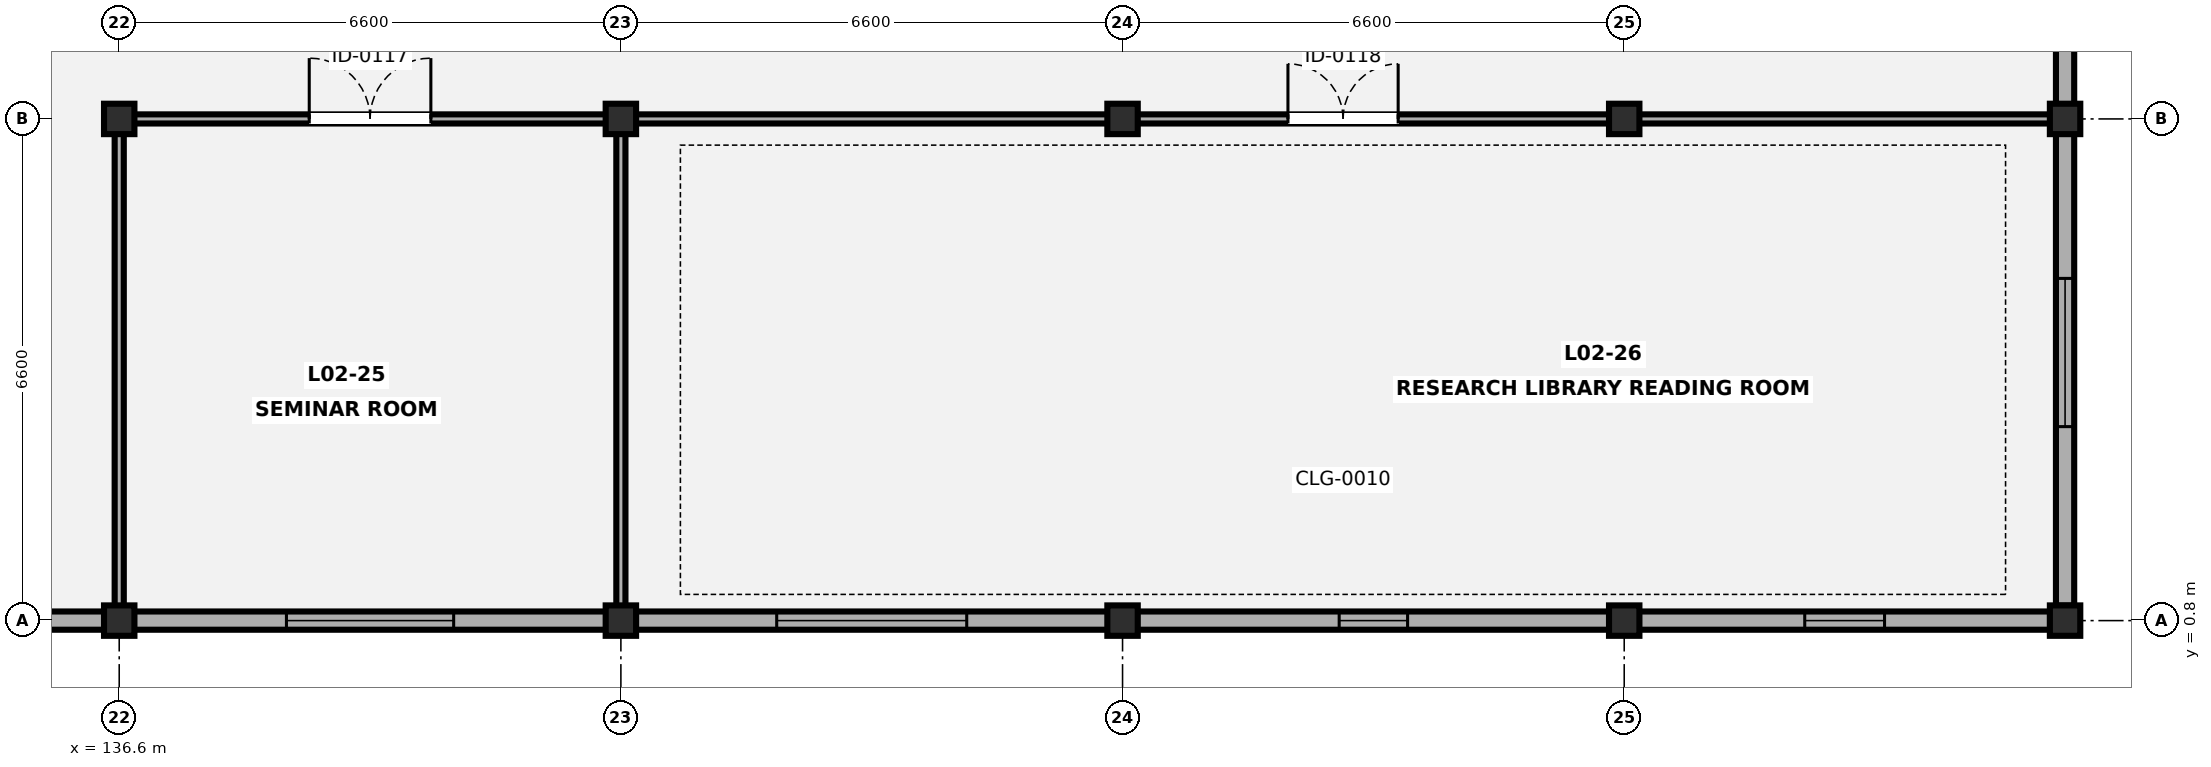
"""IFC4 building model, lengths in metres.
Left out: names, types, materials, properties, quantities, classifications, styles, units other than length and angle.
Written with IfcOpenShell. Run it as: python <this file> out.ifc"""

import sys

from ifc_helpers import new_model, si_unit, direction, frame, frame_2d, origin, origin_2d, place, context, subcontext, project, spatial, rectangle, i_section, extrude, element, fill, save


model = new_model("IFC4")
c1 = context("Model", 3, precision=1e-05, world=origin(), true_north=direction((0.0, 1.0)))
c2 = subcontext(c1, "Body", "Model", "MODEL_VIEW")
j1 = project(units=[si_unit("LENGTHUNIT", "METRE"), si_unit("PLANEANGLEUNIT", "RADIAN")], contexts=[c1])
p1 = place(None, origin())
s1 = spatial("IfcSite", under=j1, at=p1, CompositionType="ELEMENT")
p2 = place(p1, origin())
s2 = spatial("IfcBuilding", under=s1, at=p2, CompositionType="ELEMENT")
p3 = place(p2, frame((0.0, 0.0, 9.1)))
s3 = spatial("IfcBuildingStorey", under=s2, at=p3, CompositionType="ELEMENT", Elevation=9.1)
for number, where, z_axis, x_axis in (
    (1, (136.6, 0.8, 0.0), (0.0, 0.0, 1.0), (1.0, 0.0, 0.0)),
    (2, (136.6, 7.4, 0.0), (0.0, 0.0, 1.0), (1.0, 0.0, 0.0)),
    (3, (143.2, 0.8, 0.0), (0.0, 0.0, 1.0), (1.0, 0.0, 0.0)),
    (4, (143.2, 7.4, 0.0), (0.0, 0.0, 1.0), (1.0, 0.0, 0.0)),
    (5, (149.8, 0.8, 0.0), (0.0, 0.0, 1.0), (1.0, 0.0, 0.0)),
    (6, (149.8, 7.4, 0.0), (0.0, 0.0, 1.0), (1.0, 0.0, 0.0)),
    (7, (156.4, 0.8, 0.0), (0.0, 0.0, 1.0), (1.0, 0.0, 0.0)),
    (8, (156.4, 7.4, 0.0), (0.0, 0.0, 1.0), (1.0, 0.0, 0.0)),
    (9, (162.2, 0.8, 0.0), (0.0, 0.0, 1.0), (1.0, 0.0, 0.0)),
    (10, (162.2, 7.4, 0.0), (0.0, 0.0, 1.0), (1.0, 0.0, 0.0)),
):
    element("IfcColumn", number, at=place(p3, frame(where, z_axis=z_axis, x_axis=x_axis)), inside=s3, PredefinedType="COLUMN", context=c2, shape_type="SweptSolid", body=[
        extrude(i_section(OverallWidth=0.4, OverallDepth=0.4, WebThickness=0.02, FlangeThickness=0.035, FilletRadius=0.016, at=origin_2d()), origin(), (0.0, 0.0, 1.0), 4.2),
    ])
p4 = place(p3, frame((162.2, 20.402, 0.0), z_axis=(0.0, 0.0, 1.0), x_axis=(0.0, -1.0, 0.0)))
e11 = element("IfcWall", 11, at=p4, inside=s3, PredefinedType="SOLIDWALL", context=c2, shape_type="SweptSolid", body=[
    extrude(rectangle(XDim=19.404, YDim=0.24, at=frame_2d((9.702, 0.0))), origin(), (0.0, 0.0, 1.0), 3.372),
])
p5 = place(p4, frame((2.4, 0.0, 0.85)))
e12 = element("IfcOpeningElement", 12, at=p5, cuts=e11, PredefinedType="OPENING", context=c2, shape_type="SweptSolid", body=[
    extrude(rectangle(XDim=1.55, YDim=1.4, at=frame_2d((0.775, 0.7))), frame((0.0, 0.13, 0.0), z_axis=(0.0, -1.0, 0.0), x_axis=(1.0, 0.0, 0.0)), (0.0, 0.0, 1.0), 0.26),
])
p6 = place(p4, frame((15.1, 0.0, 0.85)))
e13 = element("IfcOpeningElement", 13, at=p6, cuts=e11, PredefinedType="OPENING", context=c2, shape_type="SweptSolid", body=[
    extrude(rectangle(XDim=1.95, YDim=1.5, at=frame_2d((0.975, 0.75))), frame((0.0, 0.13, 0.0), z_axis=(0.0, -1.0, 0.0), x_axis=(1.0, 0.0, 0.0)), (0.0, 0.0, 1.0), 0.26),
])
p7 = place(p3, frame((162.002, 0.8, 0.0), z_axis=(0.0, 0.0, 1.0), x_axis=(-1.0, 0.0, 0.0)))
e14 = element("IfcWall", 14, at=p7, inside=s3, PredefinedType="SOLIDWALL", context=c2, shape_type="SweptSolid", body=[
    extrude(rectangle(XDim=58.204, YDim=0.24, at=frame_2d((29.102, 0.0))), origin(), (0.0, 0.0, 1.0), 3.505),
])
p8 = place(p7, frame((53.877, 0.0, 0.85)))
e15 = element("IfcOpeningElement", 15, at=p8, cuts=e14, PredefinedType="OPENING", context=c2, shape_type="SweptSolid", body=[
    extrude(rectangle(XDim=2.45, YDim=1.4, at=frame_2d((1.225, 0.7))), frame((0.0, 0.13, 0.0), z_axis=(0.0, -1.0, 0.0), x_axis=(1.0, 0.0, 0.0)), (0.0, 0.0, 1.0), 0.26),
])
p9 = place(p7, frame((47.902, 0.0, 0.85)))
e16 = element("IfcOpeningElement", 16, at=p9, cuts=e14, PredefinedType="OPENING", context=c2, shape_type="SweptSolid", body=[
    extrude(rectangle(XDim=1.2, YDim=1.25, at=frame_2d((0.6, 0.625))), frame((0.0, 0.13, 0.0), z_axis=(0.0, -1.0, 0.0), x_axis=(1.0, 0.0, 0.0)), (0.0, 0.0, 1.0), 0.26),
])
p10 = place(p7, frame((41.177, 0.0, 0.85)))
e17 = element("IfcOpeningElement", 17, at=p10, cuts=e14, PredefinedType="OPENING", context=c2, shape_type="SweptSolid", body=[
    extrude(rectangle(XDim=1.45, YDim=1.25, at=frame_2d((0.725, 0.625))), frame((0.0, 0.13, 0.0), z_axis=(0.0, -1.0, 0.0), x_axis=(1.0, 0.0, 0.0)), (0.0, 0.0, 1.0), 0.26),
])
p11 = place(p7, frame((34.477, 0.0, 0.85)))
e18 = element("IfcOpeningElement", 18, at=p11, cuts=e14, PredefinedType="OPENING", context=c2, shape_type="SweptSolid", body=[
    extrude(rectangle(XDim=1.65, YDim=1.25, at=frame_2d((0.825, 0.625))), frame((0.0, 0.13, 0.0), z_axis=(0.0, -1.0, 0.0), x_axis=(1.0, 0.0, 0.0)), (0.0, 0.0, 1.0), 0.26),
])
p12 = place(p7, frame((27.752, 0.0, 0.85)))
e19 = element("IfcOpeningElement", 19, at=p12, cuts=e14, PredefinedType="OPENING", context=c2, shape_type="SweptSolid", body=[
    extrude(rectangle(XDim=1.9, YDim=1.25, at=frame_2d((0.95, 0.625))), frame((0.0, 0.13, 0.0), z_axis=(0.0, -1.0, 0.0), x_axis=(1.0, 0.0, 0.0)), (0.0, 0.0, 1.0), 0.26),
])
p13 = place(p7, frame((21.002, 0.0, 0.85)))
e20 = element("IfcOpeningElement", 20, at=p13, cuts=e14, PredefinedType="OPENING", context=c2, shape_type="SweptSolid", body=[
    extrude(rectangle(XDim=2.2, YDim=1.25, at=frame_2d((1.1, 0.625))), frame((0.0, 0.13, 0.0), z_axis=(0.0, -1.0, 0.0), x_axis=(1.0, 0.0, 0.0)), (0.0, 0.0, 1.0), 0.26),
])
p14 = place(p7, frame((14.252, 0.0, 0.85)))
e21 = element("IfcOpeningElement", 21, at=p14, cuts=e14, PredefinedType="OPENING", context=c2, shape_type="SweptSolid", body=[
    extrude(rectangle(XDim=2.5, YDim=1.25, at=frame_2d((1.25, 0.625))), frame((0.0, 0.13, 0.0), z_axis=(0.0, -1.0, 0.0), x_axis=(1.0, 0.0, 0.0)), (0.0, 0.0, 1.0), 0.26),
])
p15 = place(p7, frame((8.452, 0.0, 0.85)))
e22 = element("IfcOpeningElement", 22, at=p15, cuts=e14, PredefinedType="OPENING", context=c2, shape_type="SweptSolid", body=[
    extrude(rectangle(XDim=0.9, YDim=1.35, at=frame_2d((0.45, 0.675))), frame((0.0, 0.13, 0.0), z_axis=(0.0, -1.0, 0.0), x_axis=(1.0, 0.0, 0.0)), (0.0, 0.0, 1.0), 0.26),
])
p16 = place(p7, frame((2.177, 0.0, 0.85)))
e23 = element("IfcOpeningElement", 23, at=p16, cuts=e14, PredefinedType="OPENING", context=c2, shape_type="SweptSolid", body=[
    extrude(rectangle(XDim=1.05, YDim=1.35, at=frame_2d((0.525, 0.675))), frame((0.0, 0.13, 0.0), z_axis=(0.0, -1.0, 0.0), x_axis=(1.0, 0.0, 0.0)), (0.0, 0.0, 1.0), 0.26),
])
p17 = place(p3, frame((136.6, 7.4, 0.0), z_axis=(0.0, 0.0, 1.0), x_axis=(1.0, 0.0, 0.0)))
e24 = element("IfcWall", 24, at=p17, inside=s3, PredefinedType="PARTITIONING", context=c2, shape_type="SweptSolid", body=[
    extrude(rectangle(XDim=6.6, YDim=0.12, at=frame_2d((3.3, 0.0))), origin(), (0.0, 0.0, 1.0), 3.293),
])
p18 = place(p17, frame((2.5, 0.0, 0.0)))
e25 = element("IfcOpeningElement", 25, at=p18, cuts=e24, PredefinedType="OPENING", context=c2, shape_type="SweptSolid", body=[
    extrude(rectangle(XDim=1.6, YDim=2.18, at=frame_2d((0.8, 1.09))), frame((0.0, 0.07, 0.0), z_axis=(0.0, -1.0, 0.0), x_axis=(1.0, 0.0, 0.0)), (0.0, 0.0, 1.0), 0.14),
])
p19 = place(p3, frame((136.6, 0.942, 0.0), z_axis=(0.0, 0.0, 1.0), x_axis=(0.0, 1.0, 0.0)))
e26 = element("IfcWall", 26, at=p19, inside=s3, PredefinedType="PARTITIONING", context=c2, shape_type="SweptSolid", body=[
    extrude(rectangle(XDim=6.396, YDim=0.12, at=frame_2d((3.198, 0.0))), origin(), (0.0, 0.0, 1.0), 3.372),
])
p20 = place(p3, frame((143.2, 0.942, 0.0), z_axis=(0.0, 0.0, 1.0), x_axis=(0.0, 1.0, 0.0)))
e27 = element("IfcWall", 27, at=p20, inside=s3, PredefinedType="PARTITIONING", context=c2, shape_type="SweptSolid", body=[
    extrude(rectangle(XDim=6.458, YDim=0.12, at=frame_2d((3.229, 0.0))), origin(), (0.0, 0.0, 1.0), 3.372),
])
p21 = place(p3, frame((143.202, 7.4, 0.0), z_axis=(0.0, 0.0, 1.0), x_axis=(1.0, 0.0, 0.0)))
e28 = element("IfcWall", 28, at=p21, inside=s3, PredefinedType="PARTITIONING", context=c2, shape_type="SweptSolid", body=[
    extrude(rectangle(XDim=18.998, YDim=0.12, at=frame_2d((9.499, 0.0))), origin(), (0.0, 0.0, 1.0), 3.293),
])
p22 = place(p21, frame((8.774, 0.0, 0.0)))
e29 = element("IfcOpeningElement", 29, at=p22, cuts=e28, PredefinedType="OPENING", context=c2, shape_type="SweptSolid", body=[
    extrude(rectangle(XDim=1.45, YDim=2.12, at=frame_2d((0.725, 1.06))), frame((0.0, 0.07, 0.0), z_axis=(0.0, -1.0, 0.0), x_axis=(1.0, 0.0, 0.0)), (0.0, 0.0, 1.0), 0.14),
])
p23 = place(p6, origin())
e30 = element("IfcWindow", 30, at=p23, inside=s3, PartitioningType="SINGLE_PANEL", PredefinedType="WINDOW", context=c2, shape_type="SweptSolid", body=[
    extrude(rectangle(XDim=1.95, YDim=1.5, at=frame_2d((0.975, 0.75))), frame((0.0, 0.03, 0.0), z_axis=(0.0, -1.0, 0.0), x_axis=(1.0, 0.0, 0.0)), (0.0, 0.0, 1.0), 0.06),
])
fill(e13, e30)
p24 = place(p13, origin())
e31 = element("IfcWindow", 31, at=p24, inside=s3, PartitioningType="SINGLE_PANEL", PredefinedType="WINDOW", context=c2, shape_type="SweptSolid", body=[
    extrude(rectangle(XDim=2.2, YDim=1.25, at=frame_2d((1.1, 0.625))), frame((0.0, 0.03, 0.0), z_axis=(0.0, -1.0, 0.0), x_axis=(1.0, 0.0, 0.0)), (0.0, 0.0, 1.0), 0.06),
])
fill(e20, e31)
p25 = place(p14, origin())
e32 = element("IfcWindow", 32, at=p25, inside=s3, PartitioningType="SINGLE_PANEL", PredefinedType="WINDOW", context=c2, shape_type="SweptSolid", body=[
    extrude(rectangle(XDim=2.5, YDim=1.25, at=frame_2d((1.25, 0.625))), frame((0.0, 0.03, 0.0), z_axis=(0.0, -1.0, 0.0), x_axis=(1.0, 0.0, 0.0)), (0.0, 0.0, 1.0), 0.06),
])
fill(e21, e32)
p26 = place(p15, origin())
e33 = element("IfcWindow", 33, at=p26, inside=s3, PartitioningType="SINGLE_PANEL", PredefinedType="WINDOW", context=c2, shape_type="SweptSolid", body=[
    extrude(rectangle(XDim=0.9, YDim=1.35, at=frame_2d((0.45, 0.675))), frame((0.0, 0.03, 0.0), z_axis=(0.0, -1.0, 0.0), x_axis=(1.0, 0.0, 0.0)), (0.0, 0.0, 1.0), 0.06),
])
fill(e22, e33)
p27 = place(p16, origin())
e34 = element("IfcWindow", 34, at=p27, inside=s3, PartitioningType="SINGLE_PANEL", PredefinedType="WINDOW", context=c2, shape_type="SweptSolid", body=[
    extrude(rectangle(XDim=1.05, YDim=1.35, at=frame_2d((0.525, 0.675))), frame((0.0, 0.03, 0.0), z_axis=(0.0, -1.0, 0.0), x_axis=(1.0, 0.0, 0.0)), (0.0, 0.0, 1.0), 0.06),
])
fill(e23, e34)
p28 = place(p18, origin())
e35 = element("IfcDoor", 35, at=p28, inside=s3, OperationType="DOUBLE_DOOR_SINGLE_SWING", PredefinedType="DOOR", context=c2, shape_type="SweptSolid", body=[
    extrude(rectangle(XDim=1.6, YDim=2.18, at=frame_2d((0.8, 1.09))), frame((0.0, 0.025, 0.0), z_axis=(0.0, -1.0, 0.0), x_axis=(1.0, 0.0, 0.0)), (0.0, 0.0, 1.0), 0.05),
])
fill(e25, e35)
p29 = place(p22, origin())
e36 = element("IfcDoor", 36, at=p29, inside=s3, OperationType="DOUBLE_DOOR_SINGLE_SWING", PredefinedType="DOOR", context=c2, shape_type="SweptSolid", body=[
    extrude(rectangle(XDim=1.45, YDim=2.12, at=frame_2d((0.725, 1.06))), frame((0.0, 0.025, 0.0), z_axis=(0.0, -1.0, 0.0), x_axis=(1.0, 0.0, 0.0)), (0.0, 0.0, 1.0), 0.05),
])
fill(e29, e36)
save(model, sys.argv[1])
